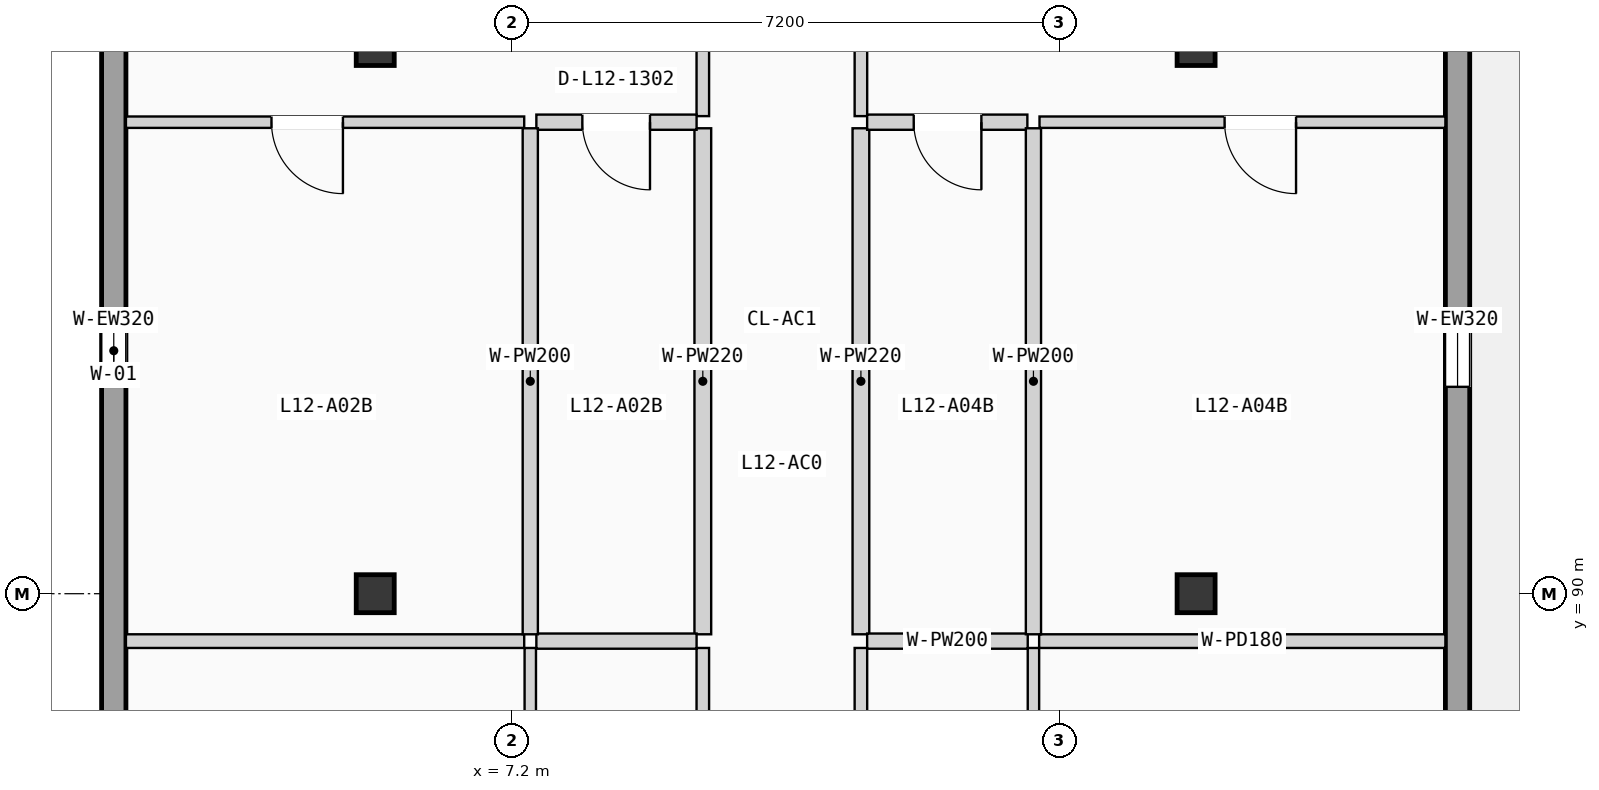
"""IFC4 building model, lengths in metres.
Left out: names, types, materials, properties, quantities, classifications, styles, units other than length and angle.
Written with IfcOpenShell. Run it as: python <this file> out.ifc"""

import sys

from ifc_helpers import new_model, si_unit, direction, frame, frame_2d, origin, origin_2d, place, context, subcontext, project, spatial, rectangle, extrude, element, fill, save


model = new_model("IFC4")
c1 = context("Model", 3, precision=1e-05, world=origin(), true_north=direction((0.0, 1.0)))
c2 = subcontext(c1, "Body", "Model", "MODEL_VIEW")
j1 = project(units=[si_unit("LENGTHUNIT", "METRE"), si_unit("PLANEANGLEUNIT", "RADIAN")], contexts=[c1])
p1 = place(None, origin())
s1 = spatial("IfcSite", under=j1, at=p1, CompositionType="ELEMENT")
p2 = place(p1, origin())
s2 = spatial("IfcBuilding", under=s1, at=p2, CompositionType="ELEMENT")
p3 = place(p2, frame((0.0, 0.0, 40.425)))
s3 = spatial("IfcBuildingStorey", under=s2, at=p3, CompositionType="ELEMENT", Elevation=40.425)
for number, where, z_axis, x_axis in (
    (1, (5.4, 90.0, 0.0), (0.0, 0.0, 1.0), (1.0, 0.0, 0.0)),
    (2, (5.4, 97.2, 0.0), (0.0, 0.0, 1.0), (1.0, 0.0, 0.0)),
    (3, (16.2, 90.0, 0.0), (0.0, 0.0, 1.0), (1.0, 0.0, 0.0)),
    (4, (16.2, 97.2, 0.0), (0.0, 0.0, 1.0), (1.0, 0.0, 0.0)),
):
    element("IfcColumn", number, at=place(p3, frame(where, z_axis=z_axis, x_axis=x_axis)), inside=s3, PredefinedType="COLUMN", context=c2, shape_type="SweptSolid", body=[
        extrude(rectangle(XDim=0.5, YDim=0.5, at=origin_2d()), origin(), (0.0, 0.0, 1.0), 3.15),
    ])
p4 = place(p3, frame((1.96, 68.72, 0.0), z_axis=(0.0, 0.0, 1.0), x_axis=(0.0, 1.0, 0.0)))
e5 = element("IfcWall", 5, at=p4, inside=s3, PredefinedType="SOLIDWALL", context=c2, shape_type="SweptSolid", body=[
    extrude(rectangle(XDim=49.76, YDim=0.32, at=frame_2d((24.88, 0.0))), origin(), (0.0, 0.0, 1.0), 2.89),
])
p5 = place(p4, frame((12.119, 0.0, 0.9)))
e6 = element("IfcOpeningElement", 6, at=p5, cuts=e5, PredefinedType="OPENING", context=c2, shape_type="SweptSolid", body=[
    extrude(rectangle(XDim=1.05, YDim=1.2, at=frame_2d((0.525, 0.6))), frame((0.0, 0.17, 0.0), z_axis=(0.0, -1.0, 0.0), x_axis=(1.0, 0.0, 0.0)), (0.0, 0.0, 1.0), 0.34),
])
p6 = place(p4, frame((8.774, 0.0, 0.855)))
e7 = element("IfcOpeningElement", 7, at=p6, cuts=e5, PredefinedType="OPENING", context=c2, shape_type="SweptSolid", body=[
    extrude(rectangle(XDim=1.05, YDim=1.35, at=frame_2d((0.525, 0.675))), frame((0.0, 0.17, 0.0), z_axis=(0.0, -1.0, 0.0), x_axis=(1.0, 0.0, 0.0)), (0.0, 0.0, 1.0), 0.34),
])
p7 = place(p4, frame((18.022, 0.0, 0.705)))
e8 = element("IfcOpeningElement", 8, at=p7, cuts=e5, PredefinedType="OPENING", context=c2, shape_type="SweptSolid", body=[
    extrude(rectangle(XDim=1.05, YDim=1.5, at=frame_2d((0.525, 0.75))), frame((0.0, 0.17, 0.0), z_axis=(0.0, -1.0, 0.0), x_axis=(1.0, 0.0, 0.0)), (0.0, 0.0, 1.0), 0.34),
])
p8 = place(p4, frame((31.555, 0.0, 0.555)))
e9 = element("IfcOpeningElement", 9, at=p8, cuts=e5, PredefinedType="OPENING", context=c2, shape_type="SweptSolid", body=[
    extrude(rectangle(XDim=1.05, YDim=1.65, at=frame_2d((0.525, 0.825))), frame((0.0, 0.17, 0.0), z_axis=(0.0, -1.0, 0.0), x_axis=(1.0, 0.0, 0.0)), (0.0, 0.0, 1.0), 0.34),
])
p9 = place(p4, frame((24.002, 0.0, 0.85)))
e10 = element("IfcOpeningElement", 10, at=p9, cuts=e5, PredefinedType="OPENING", context=c2, shape_type="SweptSolid", body=[
    extrude(rectangle(XDim=0.95, YDim=1.2, at=frame_2d((0.475, 0.6))), frame((0.0, 0.17, 0.0), z_axis=(0.0, -1.0, 0.0), x_axis=(1.0, 0.0, 0.0)), (0.0, 0.0, 1.0), 0.34),
])
p10 = place(p4, frame((39.02, 0.0, 0.9)))
e11 = element("IfcOpeningElement", 11, at=p10, cuts=e5, PredefinedType="OPENING", context=c2, shape_type="SweptSolid", body=[
    extrude(rectangle(XDim=1.15, YDim=1.2, at=frame_2d((0.575, 0.6))), frame((0.0, 0.17, 0.0), z_axis=(0.0, -1.0, 0.0), x_axis=(1.0, 0.0, 0.0)), (0.0, 0.0, 1.0), 0.34),
])
p11 = place(p3, frame((19.64, 68.72, 0.0), z_axis=(0.0, 0.0, 1.0), x_axis=(0.0, 1.0, 0.0)))
e12 = element("IfcWall", 12, at=p11, inside=s3, PredefinedType="SOLIDWALL", context=c2, shape_type="SweptSolid", body=[
    extrude(rectangle(XDim=49.76, YDim=0.32, at=frame_2d((24.88, 0.0))), origin(), (0.0, 0.0, 1.0), 2.89),
])
p12 = place(p11, frame((12.069, 0.0, 0.855)))
e13 = element("IfcOpeningElement", 13, at=p12, cuts=e12, PredefinedType="OPENING", context=c2, shape_type="SweptSolid", body=[
    extrude(rectangle(XDim=1.15, YDim=1.35, at=frame_2d((0.575, 0.675))), frame((0.0, 0.17, 0.0), z_axis=(0.0, -1.0, 0.0), x_axis=(1.0, 0.0, 0.0)), (0.0, 0.0, 1.0), 0.34),
])
p13 = place(p11, frame((8.724, 0.0, 0.705)))
e14 = element("IfcOpeningElement", 14, at=p13, cuts=e12, PredefinedType="OPENING", context=c2, shape_type="SweptSolid", body=[
    extrude(rectangle(XDim=1.15, YDim=1.5, at=frame_2d((0.575, 0.75))), frame((0.0, 0.17, 0.0), z_axis=(0.0, -1.0, 0.0), x_axis=(1.0, 0.0, 0.0)), (0.0, 0.0, 1.0), 0.34),
])
p14 = place(p11, frame((17.879, 0.0, 0.0)))
e15 = element("IfcOpeningElement", 15, at=p14, cuts=e12, PredefinedType="OPENING", context=c2, shape_type="SweptSolid", body=[
    extrude(rectangle(XDim=0.95, YDim=2.15, at=frame_2d((0.475, 1.075))), frame((0.0, 0.17, 0.0), z_axis=(0.0, -1.0, 0.0), x_axis=(1.0, 0.0, 0.0)), (0.0, 0.0, 1.0), 0.34),
])
p15 = place(p11, frame((31.505, 0.0, 0.555)))
e16 = element("IfcOpeningElement", 16, at=p15, cuts=e12, PredefinedType="OPENING", context=c2, shape_type="SweptSolid", body=[
    extrude(rectangle(XDim=1.15, YDim=1.65, at=frame_2d((0.575, 0.825))), frame((0.0, 0.17, 0.0), z_axis=(0.0, -1.0, 0.0), x_axis=(1.0, 0.0, 0.0)), (0.0, 0.0, 1.0), 0.34),
])
p16 = place(p11, frame((24.002, 0.0, 0.85)))
e17 = element("IfcOpeningElement", 17, at=p16, cuts=e12, PredefinedType="OPENING", context=c2, shape_type="SweptSolid", body=[
    extrude(rectangle(XDim=0.95, YDim=1.2, at=frame_2d((0.475, 0.6))), frame((0.0, 0.17, 0.0), z_axis=(0.0, -1.0, 0.0), x_axis=(1.0, 0.0, 0.0)), (0.0, 0.0, 1.0), 0.34),
])
p17 = place(p11, frame((38.97, 0.0, 0.9)))
e18 = element("IfcOpeningElement", 18, at=p17, cuts=e12, PredefinedType="OPENING", context=c2, shape_type="SweptSolid", body=[
    extrude(rectangle(XDim=1.25, YDim=1.2, at=frame_2d((0.625, 0.6))), frame((0.0, 0.17, 0.0), z_axis=(0.0, -1.0, 0.0), x_axis=(1.0, 0.0, 0.0)), (0.0, 0.0, 1.0), 0.34),
])
p18 = place(p3, frame((9.71, 85.247, 0.0), z_axis=(0.0, 0.0, 1.0), x_axis=(0.0, 1.0, 0.0)))
e19 = element("IfcWall", 19, at=p18, inside=s3, PredefinedType="PARTITIONING", context=c2, shape_type="SweptSolid", body=[
    extrude(rectangle(XDim=4.039, YDim=0.165, at=frame_2d((2.02, 0.0))), origin(), (0.0, 0.0, 1.0), 2.87),
])
p19 = place(p3, frame((9.71, 96.284, 0.0), z_axis=(0.0, 0.0, 1.0), x_axis=(0.0, 1.0, 0.0)))
e20 = element("IfcWall", 20, at=p19, inside=s3, PredefinedType="PARTITIONING", context=c2, shape_type="SweptSolid", body=[
    extrude(rectangle(XDim=8.986, YDim=0.165, at=frame_2d((4.493, 0.0))), origin(), (0.0, 0.0, 1.0), 2.87),
])
p20 = place(p19, frame((4.003, 0.0, 0.0)))
e21 = element("IfcOpeningElement", 21, at=p20, cuts=e20, PredefinedType="OPENING", context=c2, shape_type="SweptSolid", body=[
    extrude(rectangle(XDim=0.98, YDim=2.08, at=frame_2d((0.49, 1.04))), frame((0.0, 0.093, 0.0), z_axis=(0.0, -1.0, 0.0), x_axis=(1.0, 0.0, 0.0)), (0.0, 0.0, 1.0), 0.185),
])
p21 = place(p3, frame((9.71, 89.466, 0.0), z_axis=(0.0, 0.0, 1.0), x_axis=(0.0, 1.0, 0.0)))
e22 = element("IfcWall", 22, at=p21, inside=s3, PredefinedType="PLUMBINGWALL", context=c2, shape_type="SweptSolid", body=[
    extrude(rectangle(XDim=6.658, YDim=0.22, at=frame_2d((3.329, 0.0))), origin(), (0.0, 0.0, 1.0), 2.87),
])
p22 = place(p3, frame((11.79, 85.247, 0.0), z_axis=(0.0, 0.0, 1.0), x_axis=(0.0, 1.0, 0.0)))
e23 = element("IfcWall", 23, at=p22, inside=s3, PredefinedType="PARTITIONING", context=c2, shape_type="SweptSolid", body=[
    extrude(rectangle(XDim=4.039, YDim=0.165, at=frame_2d((2.02, 0.0))), origin(), (0.0, 0.0, 1.0), 2.87),
])
p23 = place(p3, frame((11.79, 96.284, 0.0), z_axis=(0.0, 0.0, 1.0), x_axis=(0.0, 1.0, 0.0)))
e24 = element("IfcWall", 24, at=p23, inside=s3, PredefinedType="PARTITIONING", context=c2, shape_type="SweptSolid", body=[
    extrude(rectangle(XDim=8.986, YDim=0.165, at=frame_2d((4.493, 0.0))), origin(), (0.0, 0.0, 1.0), 2.87),
])
p24 = place(p23, frame((4.003, 0.0, 0.0)))
e25 = element("IfcOpeningElement", 25, at=p24, cuts=e24, PredefinedType="OPENING", context=c2, shape_type="SweptSolid", body=[
    extrude(rectangle(XDim=0.98, YDim=2.08, at=frame_2d((0.49, 1.04))), frame((0.0, 0.093, 0.0), z_axis=(0.0, -1.0, 0.0), x_axis=(1.0, 0.0, 0.0)), (0.0, 0.0, 1.0), 0.185),
])
p25 = place(p3, frame((11.79, 89.466, 0.0), z_axis=(0.0, 0.0, 1.0), x_axis=(0.0, 1.0, 0.0)))
e26 = element("IfcWall", 26, at=p25, inside=s3, PredefinedType="PLUMBINGWALL", context=c2, shape_type="SweptSolid", body=[
    extrude(rectangle(XDim=6.658, YDim=0.22, at=frame_2d((3.329, 0.0))), origin(), (0.0, 0.0, 1.0), 2.87),
])
p26 = place(p3, frame((7.44, 85.227, 0.0), z_axis=(0.0, 0.0, 1.0), x_axis=(0.0, 1.0, 0.0)))
e27 = element("IfcWall", 27, at=p26, inside=s3, PredefinedType="PARTITIONING", context=c2, shape_type="SweptSolid", body=[
    extrude(rectangle(XDim=4.059, YDim=0.15, at=frame_2d((2.029, 0.0))), origin(), (0.0, 0.0, 1.0), 2.87),
])
p27 = place(p3, frame((7.52, 89.376, 0.0), z_axis=(0.0, 0.0, 1.0), x_axis=(1.0, 0.0, 0.0)))
e28 = element("IfcWall", 28, at=p27, inside=s3, PredefinedType="PLUMBINGWALL", context=c2, shape_type="SweptSolid", body=[
    extrude(rectangle(XDim=2.108, YDim=0.2, at=frame_2d((1.054, 0.0))), origin(), (0.0, 0.0, 1.0), 2.87),
])
p28 = place(p3, frame((2.12, 89.376, 0.0), z_axis=(0.0, 0.0, 1.0), x_axis=(1.0, 0.0, 0.0)))
e29 = element("IfcWall", 29, at=p28, inside=s3, PredefinedType="PARTITIONING", context=c2, shape_type="SweptSolid", body=[
    extrude(rectangle(XDim=5.24, YDim=0.18, at=frame_2d((2.62, 0.0))), origin(), (0.0, 0.0, 1.0), 2.87),
])
p29 = place(p3, frame((7.52, 96.204, 0.0), z_axis=(0.0, 0.0, 1.0), x_axis=(1.0, 0.0, 0.0)))
e30 = element("IfcWall", 30, at=p29, inside=s3, PredefinedType="PLUMBINGWALL", context=c2, shape_type="SweptSolid", body=[
    extrude(rectangle(XDim=2.108, YDim=0.2, at=frame_2d((1.054, 0.0))), origin(), (0.0, 0.0, 1.0), 2.87),
])
p30 = place(p29, frame((0.605, 0.0, 0.0)))
e31 = element("IfcOpeningElement", 31, at=p30, cuts=e30, PredefinedType="OPENING", context=c2, shape_type="SweptSolid", body=[
    extrude(rectangle(XDim=0.89, YDim=2.03, at=frame_2d((0.445, 1.015))), frame((0.0, 0.11, 0.0), z_axis=(0.0, -1.0, 0.0), x_axis=(1.0, 0.0, 0.0)), (0.0, 0.0, 1.0), 0.22),
])
p31 = place(p3, frame((2.12, 96.204, 0.0), z_axis=(0.0, 0.0, 1.0), x_axis=(1.0, 0.0, 0.0)))
e32 = element("IfcWall", 32, at=p31, inside=s3, PredefinedType="PARTITIONING", context=c2, shape_type="SweptSolid", body=[
    extrude(rectangle(XDim=5.24, YDim=0.15, at=frame_2d((2.62, 0.0))), origin(), (0.0, 0.0, 1.0), 2.87),
])
p32 = place(p31, frame((1.915, 0.0, 0.0)))
e33 = element("IfcOpeningElement", 33, at=p32, cuts=e32, PredefinedType="OPENING", context=c2, shape_type="SweptSolid", body=[
    extrude(rectangle(XDim=0.94, YDim=2.06, at=frame_2d((0.47, 1.03))), frame((0.0, 0.085, 0.0), z_axis=(0.0, -1.0, 0.0), x_axis=(1.0, 0.0, 0.0)), (0.0, 0.0, 1.0), 0.17),
])
p33 = place(p3, frame((7.44, 89.466, 0.0), z_axis=(0.0, 0.0, 1.0), x_axis=(0.0, 1.0, 0.0)))
e34 = element("IfcWall", 34, at=p33, inside=s3, PredefinedType="PLUMBINGWALL", context=c2, shape_type="SweptSolid", body=[
    extrude(rectangle(XDim=6.658, YDim=0.2, at=frame_2d((3.329, 0.0))), origin(), (0.0, 0.0, 1.0), 2.87),
])
p34 = place(p3, frame((14.06, 85.227, 0.0), z_axis=(0.0, 0.0, 1.0), x_axis=(0.0, 1.0, 0.0)))
e35 = element("IfcWall", 35, at=p34, inside=s3, PredefinedType="PARTITIONING", context=c2, shape_type="SweptSolid", body=[
    extrude(rectangle(XDim=4.059, YDim=0.15, at=frame_2d((2.029, 0.0))), origin(), (0.0, 0.0, 1.0), 2.87),
])
p35 = place(p3, frame((11.872, 89.376, 0.0), z_axis=(0.0, 0.0, 1.0), x_axis=(1.0, 0.0, 0.0)))
e36 = element("IfcWall", 36, at=p35, inside=s3, PredefinedType="PLUMBINGWALL", context=c2, shape_type="SweptSolid", body=[
    extrude(rectangle(XDim=2.113, YDim=0.2, at=frame_2d((1.057, 0.0))), origin(), (0.0, 0.0, 1.0), 2.87),
])
p36 = place(p3, frame((14.135, 89.376, 0.0), z_axis=(0.0, 0.0, 1.0), x_axis=(1.0, 0.0, 0.0)))
e37 = element("IfcWall", 37, at=p36, inside=s3, PredefinedType="PARTITIONING", context=c2, shape_type="SweptSolid", body=[
    extrude(rectangle(XDim=5.345, YDim=0.18, at=frame_2d((2.672, 0.0))), origin(), (0.0, 0.0, 1.0), 2.87),
])
p37 = place(p3, frame((11.872, 96.204, 0.0), z_axis=(0.0, 0.0, 1.0), x_axis=(1.0, 0.0, 0.0)))
e38 = element("IfcWall", 38, at=p37, inside=s3, PredefinedType="PLUMBINGWALL", context=c2, shape_type="SweptSolid", body=[
    extrude(rectangle(XDim=2.108, YDim=0.2, at=frame_2d((1.054, 0.0))), origin(), (0.0, 0.0, 1.0), 2.87),
])
p38 = place(p37, frame((0.613, 0.0, 0.0)))
e39 = element("IfcOpeningElement", 39, at=p38, cuts=e38, PredefinedType="OPENING", context=c2, shape_type="SweptSolid", body=[
    extrude(rectangle(XDim=0.89, YDim=2.03, at=frame_2d((0.445, 1.015))), frame((0.0, 0.11, 0.0), z_axis=(0.0, -1.0, 0.0), x_axis=(1.0, 0.0, 0.0)), (0.0, 0.0, 1.0), 0.22),
])
p39 = place(p3, frame((14.14, 96.204, 0.0), z_axis=(0.0, 0.0, 1.0), x_axis=(1.0, 0.0, 0.0)))
e40 = element("IfcWall", 40, at=p39, inside=s3, PredefinedType="PARTITIONING", context=c2, shape_type="SweptSolid", body=[
    extrude(rectangle(XDim=5.34, YDim=0.15, at=frame_2d((2.67, 0.0))), origin(), (0.0, 0.0, 1.0), 2.87),
])
p40 = place(p39, frame((2.435, 0.0, 0.0)))
e41 = element("IfcOpeningElement", 41, at=p40, cuts=e40, PredefinedType="OPENING", context=c2, shape_type="SweptSolid", body=[
    extrude(rectangle(XDim=0.94, YDim=2.06, at=frame_2d((0.47, 1.03))), frame((0.0, 0.085, 0.0), z_axis=(0.0, -1.0, 0.0), x_axis=(1.0, 0.0, 0.0)), (0.0, 0.0, 1.0), 0.17),
])
p41 = place(p3, frame((14.06, 89.466, 0.0), z_axis=(0.0, 0.0, 1.0), x_axis=(0.0, 1.0, 0.0)))
e42 = element("IfcWall", 42, at=p41, inside=s3, PredefinedType="PLUMBINGWALL", context=c2, shape_type="SweptSolid", body=[
    extrude(rectangle(XDim=6.658, YDim=0.2, at=frame_2d((3.329, 0.0))), origin(), (0.0, 0.0, 1.0), 2.87),
])
p42 = place(p9, origin())
e43 = element("IfcWindow", 43, at=p42, inside=s3, PartitioningType="SINGLE_PANEL", PredefinedType="WINDOW", context=c2, shape_type="SweptSolid", body=[
    extrude(rectangle(XDim=0.95, YDim=1.2, at=frame_2d((0.475, 0.6))), frame((0.0, 0.03, 0.0), z_axis=(0.0, -1.0, 0.0), x_axis=(1.0, 0.0, 0.0)), (0.0, 0.0, 1.0), 0.06),
])
fill(e10, e43)
p43 = place(p16, origin())
e44 = element("IfcWindow", 44, at=p43, inside=s3, PartitioningType="SINGLE_PANEL", PredefinedType="WINDOW", context=c2, shape_type="SweptSolid", body=[
    extrude(rectangle(XDim=0.95, YDim=1.2, at=frame_2d((0.475, 0.6))), frame((0.0, 0.03, 0.0), z_axis=(0.0, -1.0, 0.0), x_axis=(1.0, 0.0, 0.0)), (0.0, 0.0, 1.0), 0.06),
])
fill(e17, e44)
p44 = place(p30, frame((0.89, 0.0, 0.0), z_axis=(0.0, 0.0, 1.0), x_axis=(-1.0, 0.0, 0.0)))
e45 = element("IfcDoor", 45, at=p44, inside=s3, OperationType="SINGLE_SWING_RIGHT", PredefinedType="DOOR", context=c2, shape_type="SweptSolid", body=[
    extrude(rectangle(XDim=0.89, YDim=2.03, at=frame_2d((0.445, 1.015))), frame((0.0, 0.025, 0.0), z_axis=(0.0, -1.0, 0.0), x_axis=(1.0, 0.0, 0.0)), (0.0, 0.0, 1.0), 0.05),
])
fill(e31, e45)
p45 = place(p32, frame((0.94, 0.0, 0.0), z_axis=(0.0, 0.0, 1.0), x_axis=(-1.0, 0.0, 0.0)))
e46 = element("IfcDoor", 46, at=p45, inside=s3, OperationType="SINGLE_SWING_RIGHT", PredefinedType="DOOR", context=c2, shape_type="SweptSolid", body=[
    extrude(rectangle(XDim=0.94, YDim=2.06, at=frame_2d((0.47, 1.03))), frame((0.0, 0.025, 0.0), z_axis=(0.0, -1.0, 0.0), x_axis=(1.0, 0.0, 0.0)), (0.0, 0.0, 1.0), 0.05),
])
fill(e33, e46)
p46 = place(p38, frame((0.89, 0.0, 0.0), z_axis=(0.0, 0.0, 1.0), x_axis=(-1.0, 0.0, 0.0)))
e47 = element("IfcDoor", 47, at=p46, inside=s3, OperationType="SINGLE_SWING_RIGHT", PredefinedType="DOOR", context=c2, shape_type="SweptSolid", body=[
    extrude(rectangle(XDim=0.89, YDim=2.03, at=frame_2d((0.445, 1.015))), frame((0.0, 0.025, 0.0), z_axis=(0.0, -1.0, 0.0), x_axis=(1.0, 0.0, 0.0)), (0.0, 0.0, 1.0), 0.05),
])
fill(e39, e47)
p47 = place(p40, frame((0.94, 0.0, 0.0), z_axis=(0.0, 0.0, 1.0), x_axis=(-1.0, 0.0, 0.0)))
e48 = element("IfcDoor", 48, at=p47, inside=s3, OperationType="SINGLE_SWING_RIGHT", PredefinedType="DOOR", context=c2, shape_type="SweptSolid", body=[
    extrude(rectangle(XDim=0.94, YDim=2.06, at=frame_2d((0.47, 1.03))), frame((0.0, 0.025, 0.0), z_axis=(0.0, -1.0, 0.0), x_axis=(1.0, 0.0, 0.0)), (0.0, 0.0, 1.0), 0.05),
])
fill(e41, e48)
save(model, sys.argv[1])
